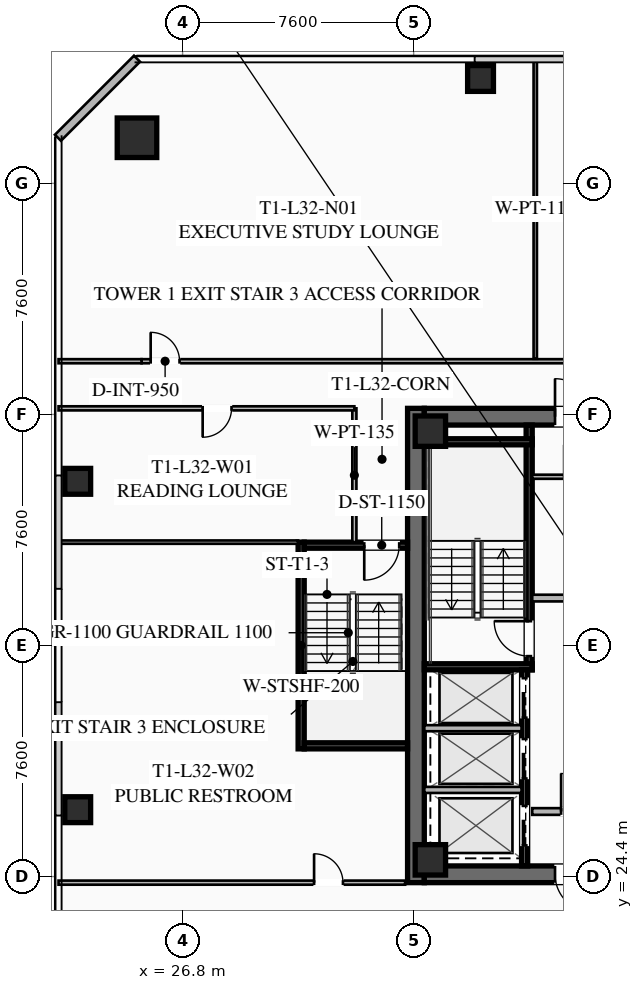
"""IFC4 building model, lengths in metres.
Left out: names, types, materials, properties, quantities, classifications, styles, units other than length and angle.
Written with IfcOpenShell. Run it as: python <this file> out.ifc"""

import sys

from ifc_helpers import new_model, si_unit, direction, frame, frame_2d, origin, origin_2d, place, context, subcontext, project, spatial, rectangle, hollow_rectangle, extrude, element, fill, save


model = new_model("IFC4")
c1 = context("Model", 3, precision=1e-05, world=origin(), true_north=direction((0.0, 1.0)))
c2 = subcontext(c1, "Body", "Model", "MODEL_VIEW")
j1 = project(units=[si_unit("LENGTHUNIT", "METRE"), si_unit("PLANEANGLEUNIT", "RADIAN")], contexts=[c1])
p1 = place(None, origin())
s1 = spatial("IfcSite", under=j1, at=p1, CompositionType="ELEMENT")
p2 = place(p1, origin())
s2 = spatial("IfcBuilding", under=s1, at=p2, CompositionType="ELEMENT")
p3 = place(p2, frame((0.0, 0.0, 121.5)))
s3 = spatial("IfcBuildingStorey", under=s2, at=p3, CompositionType="ELEMENT", Elevation=121.5)
p4 = place(p3, frame((34.475, 24.2, 0.0), z_axis=(0.0, 0.0, 1.0), x_axis=(0.0, 1.0, 0.0)))
e1 = element("IfcWall", 1, at=p4, inside=s3, PredefinedType="SHEAR", context=c2, shape_type="SweptSolid", body=[
    extrude(rectangle(XDim=15.6, YDim=0.55, at=frame_2d((7.8, 0.0))), origin(), (0.0, 0.0, 1.0), 3.55),
])
p5 = place(p3, frame((49.25, 24.475, 0.0), z_axis=(0.0, 0.0, 1.0), x_axis=(-1.0, 0.0, 0.0)))
e2 = element("IfcWall", 2, at=p5, inside=s3, PredefinedType="SHEAR", context=c2, shape_type="SweptSolid", body=[
    extrude(rectangle(XDim=14.5, YDim=0.55, at=frame_2d((7.25, 0.0))), origin(), (0.0, 0.0, 1.0), 3.55),
])
p6 = place(p5, frame((8.95, 0.0, 0.0)))
e3 = element("IfcOpeningElement", 3, at=p6, cuts=e2, PredefinedType="OPENING", context=c2, shape_type="SweptSolid", body=[
    extrude(rectangle(XDim=1.25, YDim=2.25, at=frame_2d((0.625, 1.125))), frame((0.0, 0.285, 0.0), z_axis=(0.0, -1.0, 0.0), x_axis=(1.0, 0.0, 0.0)), (0.0, 0.0, 1.0), 0.57),
])
p7 = place(p5, frame((3.9, 0.0, 0.0)))
e4 = element("IfcOpeningElement", 4, at=p7, cuts=e2, PredefinedType="OPENING", context=c2, shape_type="SweptSolid", body=[
    extrude(rectangle(XDim=1.25, YDim=2.25, at=frame_2d((0.625, 1.125))), frame((0.0, 0.285, 0.0), z_axis=(0.0, -1.0, 0.0), x_axis=(1.0, 0.0, 0.0)), (0.0, 0.0, 1.0), 0.57),
])
p8 = place(p3, frame((34.75, 39.525, 0.0), z_axis=(0.0, 0.0, 1.0), x_axis=(1.0, 0.0, 0.0)))
e5 = element("IfcWall", 5, at=p8, inside=s3, PredefinedType="SHEAR", context=c2, shape_type="SweptSolid", body=[
    extrude(rectangle(XDim=14.5, YDim=0.55, at=frame_2d((7.25, 0.0))), origin(), (0.0, 0.0, 1.0), 3.55),
])
p9 = place(p8, frame((4.3, 0.0, 0.0)))
e6 = element("IfcOpeningElement", 6, at=p9, cuts=e5, PredefinedType="OPENING", context=c2, shape_type="SweptSolid", body=[
    extrude(rectangle(XDim=1.25, YDim=2.25, at=frame_2d((0.625, 1.125))), frame((0.0, 0.285, 0.0), z_axis=(0.0, -1.0, 0.0), x_axis=(1.0, 0.0, 0.0)), (0.0, 0.0, 1.0), 0.57),
])
p10 = place(p8, frame((9.35, 0.0, 0.0)))
e7 = element("IfcOpeningElement", 7, at=p10, cuts=e5, PredefinedType="OPENING", context=c2, shape_type="SweptSolid", body=[
    extrude(rectangle(XDim=1.25, YDim=2.25, at=frame_2d((0.625, 1.125))), frame((0.0, 0.285, 0.0), z_axis=(0.0, -1.0, 0.0), x_axis=(1.0, 0.0, 0.0)), (0.0, 0.0, 1.0), 0.57),
])
for number, where, z_axis, x_axis in (
    (8, (34.95, 24.95, 0.0), (0.0, 0.0, 1.0), (1.0, 0.0, 0.0)),
    (9, (34.95, 39.05, 0.0), (0.0, 0.0, 1.0), (1.0, 0.0, 0.0)),
):
    element("IfcColumn", number, at=place(p3, frame(where, z_axis=z_axis, x_axis=x_axis)), inside=s3, PredefinedType="COLUMN", context=c2, shape_type="SweptSolid", body=[
        extrude(hollow_rectangle(XDim=1.0, YDim=1.0, WallThickness=0.04, at=origin_2d()), origin(), (0.0, 0.0, 1.0), 3.37),
    ])
p11 = place(p3, frame((25.3, 48.7, 0.0), z_axis=(0.0, 0.0, 1.0), x_axis=(1.0, 0.0, 0.0)))
e10 = element("IfcColumn", 10, at=p11, inside=s3, PredefinedType="COLUMN", context=c2, shape_type="SweptSolid", body=[
    extrude(hollow_rectangle(XDim=1.3, YDim=1.3, WallThickness=0.05, at=origin_2d()), origin(), (0.0, 0.0, 1.0), 3.37),
])
for number, where, z_axis, x_axis in (
    (11, (36.6, 50.65, 0.0), (0.0, 0.0, 1.0), (1.0, 0.0, 0.0)),
    (12, (23.35, 37.4, 0.0), (0.0, 0.0, 1.0), (1.0, 0.0, 0.0)),
    (13, (23.35, 26.6, 0.0), (0.0, 0.0, 1.0), (1.0, 0.0, 0.0)),
):
    element("IfcColumn", number, at=place(p3, frame(where, z_axis=z_axis, x_axis=x_axis)), inside=s3, PredefinedType="COLUMN", context=c2, shape_type="SweptSolid", body=[
        extrude(hollow_rectangle(XDim=0.85, YDim=0.85, WallThickness=0.035, at=origin_2d()), origin(), (0.0, 0.0, 1.0), 3.37),
    ])
p12 = place(p3, frame((22.7, 48.7, 0.0), z_axis=(0.0, 0.0, 1.0), x_axis=(0.707106781187, 0.707106781187, 0.0)))
e14 = element("IfcWall", 14, at=p12, inside=s3, PredefinedType="SOLIDWALL", context=c2, shape_type="SweptSolid", body=[
    extrude(rectangle(XDim=3.677, YDim=0.28, at=frame_2d((1.838, 0.0))), origin(), (0.0, 0.0, 1.0), 3.37),
])
p13 = place(p3, frame((38.2, 31.2, 0.0), z_axis=(0.0, 0.0, 1.0), x_axis=(0.0, 1.0, 0.0)))
e15 = element("IfcWall", 15, at=p13, inside=s3, PredefinedType="SHEAR", context=c2, shape_type="SweptSolid", body=[
    extrude(rectangle(XDim=8.05, YDim=0.2, at=frame_2d((4.025, 0.0))), origin(), (0.0, 0.0, 1.0), 3.37),
])
p14 = place(p13, frame((0.45, 0.0, 0.0)))
e16 = element("IfcOpeningElement", 16, at=p14, cuts=e15, PredefinedType="OPENING", context=c2, shape_type="SweptSolid", body=[
    extrude(rectangle(XDim=1.15, YDim=2.2, at=frame_2d((0.575, 1.1))), frame((0.0, 0.11, 0.0), z_axis=(0.0, -1.0, 0.0), x_axis=(1.0, 0.0, 0.0)), (0.0, 0.0, 1.0), 0.22),
])
for number, where, z_axis, x_axis in (
    (17, (34.75, 31.3, 0.0), (0.0, 0.0, 1.0), (1.0, 0.0, 0.0)),
    (18, (34.75, 38.7, 0.0), (0.0, 0.0, 1.0), (1.0, 0.0, 0.0)),
):
    element("IfcWall", number, at=place(p3, frame(where, z_axis=z_axis, x_axis=x_axis)), inside=s3, PredefinedType="SHEAR", context=c2, shape_type="SweptSolid", body=[
        extrude(rectangle(XDim=3.55, YDim=0.2, at=frame_2d((1.775, 0.0))), origin(), (0.0, 0.0, 1.0), 3.37),
    ])
p15 = place(p3, frame((38.3, 33.56, 0.0), z_axis=(0.0, 0.0, 1.0), x_axis=(1.0, 0.0, 0.0)))
e19 = element("IfcWall", 19, at=p15, inside=s3, PredefinedType="SOLIDWALL", context=c2, shape_type="SweptSolid", body=[
    extrude(rectangle(XDim=3.15, YDim=0.22, at=frame_2d((1.575, 0.0))), origin(), (0.0, 0.0, 1.0), 2.723),
])
p16 = place(p3, frame((38.3, 26.54, 0.0), z_axis=(0.0, 0.0, 1.0), x_axis=(1.0, 0.0, 0.0)))
e20 = element("IfcWall", 20, at=p16, inside=s3, PredefinedType="SOLIDWALL", context=c2, shape_type="SweptSolid", body=[
    extrude(rectangle(XDim=3.15, YDim=0.22, at=frame_2d((1.575, 0.0))), origin(), (0.0, 0.0, 1.0), 2.723),
])
p17 = place(p16, frame((0.95, 0.0, 0.0)))
e21 = element("IfcOpeningElement", 21, at=p17, cuts=e20, PredefinedType="OPENING", context=c2, shape_type="SweptSolid", body=[
    extrude(rectangle(XDim=1.25, YDim=2.25, at=frame_2d((0.625, 1.125))), frame((0.0, 0.12, 0.0), z_axis=(0.0, -1.0, 0.0), x_axis=(1.0, 0.0, 0.0)), (0.0, 0.0, 1.0), 0.24),
])
p18 = place(p3, frame((38.05, 24.75, 0.0), z_axis=(0.0, 0.0, 1.0), x_axis=(0.0, 1.0, 0.0)))
e22 = element("IfcWall", 22, at=p18, inside=s3, PredefinedType="SHEAR", context=c2, shape_type="SweptSolid", body=[
    extrude(rectangle(XDim=6.45, YDim=0.2, at=frame_2d((3.225, 0.0))), origin(), (0.0, 0.0, 1.0), 3.37),
])
p19 = place(p18, frame((4.875, 0.0, 0.0)))
e23 = element("IfcOpeningElement", 23, at=p19, cuts=e22, PredefinedType="OPENING", context=c2, shape_type="SweptSolid", body=[
    extrude(rectangle(XDim=1.3, YDim=2.25, at=frame_2d((0.65, 1.125))), frame((0.0, 0.11, 0.0), z_axis=(0.0, -1.0, 0.0), x_axis=(1.0, 0.0, 0.0)), (0.0, 0.0, 1.0), 0.22),
])
p20 = place(p18, frame((2.875, 0.0, 0.0)))
e24 = element("IfcOpeningElement", 24, at=p20, cuts=e22, PredefinedType="OPENING", context=c2, shape_type="SweptSolid", body=[
    extrude(rectangle(XDim=1.3, YDim=2.25, at=frame_2d((0.65, 1.125))), frame((0.0, 0.11, 0.0), z_axis=(0.0, -1.0, 0.0), x_axis=(1.0, 0.0, 0.0)), (0.0, 0.0, 1.0), 0.22),
])
p21 = place(p18, frame((0.675, 0.0, 0.0)))
e25 = element("IfcOpeningElement", 25, at=p21, cuts=e22, PredefinedType="OPENING", context=c2, shape_type="SweptSolid", body=[
    extrude(rectangle(XDim=1.3, YDim=2.25, at=frame_2d((0.65, 1.125))), frame((0.0, 0.11, 0.0), z_axis=(0.0, -1.0, 0.0), x_axis=(1.0, 0.0, 0.0)), (0.0, 0.0, 1.0), 0.22),
])
for number, where, z_axis, x_axis in (
    (26, (34.75, 27.25, 0.0), (0.0, 0.0, 1.0), (1.0, 0.0, 0.0)),
    (27, (34.75, 29.28, 0.0), (0.0, 0.0, 1.0), (1.0, 0.0, 0.0)),
):
    element("IfcWall", number, at=place(p3, frame(where, z_axis=z_axis, x_axis=x_axis)), inside=s3, PredefinedType="SOLIDWALL", context=c2, shape_type="SweptSolid", body=[
        extrude(rectangle(XDim=3.2, YDim=0.2, at=frame_2d((1.6, 0.0))), origin(), (0.0, 0.0, 1.0), 3.37),
    ])
p22 = place(p3, frame((38.3, 37.55, 0.0), z_axis=(0.0, 0.0, 1.0), x_axis=(1.0, 0.0, 0.0)))
e28 = element("IfcWall", 28, at=p22, inside=s3, PredefinedType="PARTITIONING", context=c2, shape_type="SweptSolid", body=[
    extrude(rectangle(XDim=3.15, YDim=0.135, at=frame_2d((1.575, 0.0))), origin(), (0.0, 0.0, 1.0), 2.723),
])
p23 = place(p22, frame((1.05, 0.0, 0.0)))
e29 = element("IfcOpeningElement", 29, at=p23, cuts=e28, PredefinedType="OPENING", context=c2, shape_type="SweptSolid", body=[
    extrude(rectangle(XDim=1.05, YDim=2.2, at=frame_2d((0.525, 1.1))), frame((0.0, 0.077, 0.0), z_axis=(0.0, -1.0, 0.0), x_axis=(1.0, 0.0, 0.0)), (0.0, 0.0, 1.0), 0.155),
])
p24 = place(p3, frame((30.7, 28.6, 0.0), z_axis=(0.0, 0.0, 1.0), x_axis=(0.0, 1.0, 0.0)))
e30 = element("IfcWall", 30, at=p24, inside=s3, PredefinedType="SHEAR", context=c2, shape_type="SweptSolid", body=[
    extrude(rectangle(XDim=6.8, YDim=0.2, at=frame_2d((3.4, 0.0))), origin(), (0.0, 0.0, 1.0), 3.37),
])
p25 = place(p3, frame((34.2, 35.3, 0.0), z_axis=(0.0, 0.0, 1.0), x_axis=(-1.0, 0.0, 0.0)))
e31 = element("IfcWall", 31, at=p25, inside=s3, PredefinedType="SHEAR", context=c2, shape_type="SweptSolid", body=[
    extrude(rectangle(XDim=3.4, YDim=0.2, at=frame_2d((1.7, 0.0))), origin(), (0.0, 0.0, 1.0), 3.37),
])
p26 = place(p25, frame((0.275, 0.0, 0.0)))
e32 = element("IfcOpeningElement", 32, at=p26, cuts=e31, PredefinedType="OPENING", context=c2, shape_type="SweptSolid", body=[
    extrude(rectangle(XDim=1.15, YDim=2.2, at=frame_2d((0.575, 1.1))), frame((0.0, 0.11, 0.0), z_axis=(0.0, -1.0, 0.0), x_axis=(1.0, 0.0, 0.0)), (0.0, 0.0, 1.0), 0.22),
])
p27 = place(p3, frame((30.8, 28.7, 0.0), z_axis=(0.0, 0.0, 1.0), x_axis=(1.0, 0.0, 0.0)))
e33 = element("IfcWall", 33, at=p27, inside=s3, PredefinedType="SHEAR", context=c2, shape_type="SweptSolid", body=[
    extrude(rectangle(XDim=3.4, YDim=0.2, at=frame_2d((1.7, 0.0))), origin(), (0.0, 0.0, 1.0), 3.37),
])
p28 = place(p3, frame((32.45, 35.4, 0.0), z_axis=(0.0, 0.0, 1.0), x_axis=(0.0, 1.0, 0.0)))
e34 = element("IfcWall", 34, at=p28, inside=s3, PredefinedType="PARTITIONING", context=c2, shape_type="SweptSolid", body=[
    extrude(rectangle(XDim=4.4, YDim=0.135, at=frame_2d((2.2, 0.0))), origin(), (0.0, 0.0, 1.0), 2.723),
])
p29 = place(p3, frame((25.45, 41.35, 0.0), z_axis=(0.0, 0.0, 1.0), x_axis=(1.0, 0.0, 0.0)))
e35 = element("IfcWall", 35, at=p29, inside=s3, PredefinedType="PARTITIONING", context=c2, shape_type="SweptSolid", body=[
    extrude(rectangle(XDim=33.1, YDim=0.135, at=frame_2d((16.55, 0.0))), origin(), (0.0, 0.0, 1.0), 2.723),
])
p30 = place(p29, frame((0.3, 0.0, 0.0)))
e36 = element("IfcOpeningElement", 36, at=p30, cuts=e35, PredefinedType="OPENING", context=c2, shape_type="SweptSolid", body=[
    extrude(rectangle(XDim=0.95, YDim=2.05, at=frame_2d((0.475, 1.025))), frame((0.0, 0.077, 0.0), z_axis=(0.0, -1.0, 0.0), x_axis=(1.0, 0.0, 0.0)), (0.0, 0.0, 1.0), 0.155),
])
p31 = place(p29, frame((31.85, 0.0, 0.0)))
e37 = element("IfcOpeningElement", 37, at=p31, cuts=e35, PredefinedType="OPENING", context=c2, shape_type="SweptSolid", body=[
    extrude(rectangle(XDim=0.95, YDim=2.05, at=frame_2d((0.475, 1.025))), frame((0.0, 0.077, 0.0), z_axis=(0.0, -1.0, 0.0), x_axis=(1.0, 0.0, 0.0)), (0.0, 0.0, 1.0), 0.155),
])
p32 = place(p3, frame((22.72, 41.35, 0.0), z_axis=(0.0, 0.0, 1.0), x_axis=(1.0, 0.0, 0.0)))
e38 = element("IfcWall", 38, at=p32, inside=s3, PredefinedType="PARTITIONING", context=c2, shape_type="SweptSolid", body=[
    extrude(rectangle(XDim=2.73, YDim=0.135, at=frame_2d((1.365, 0.0))), origin(), (0.0, 0.0, 1.0), 2.723),
])
p33 = place(p3, frame((38.4, 41.43, 0.0), z_axis=(0.0, 0.0, 1.0), x_axis=(0.0, 1.0, 0.0)))
e39 = element("IfcWall", 39, at=p33, inside=s3, PredefinedType="PARTITIONING", context=c2, shape_type="SweptSolid", body=[
    extrude(rectangle(XDim=9.85, YDim=0.11, at=frame_2d((4.925, 0.0))), origin(), (0.0, 0.0, 1.0), 2.723),
])
p34 = place(p3, frame((32.45, 39.8, 0.0), z_axis=(0.0, 0.0, 1.0), x_axis=(-1.0, 0.0, 0.0)))
e40 = element("IfcWall", 40, at=p34, inside=s3, PredefinedType="PARTITIONING", context=c2, shape_type="SweptSolid", body=[
    extrude(rectangle(XDim=9.73, YDim=0.135, at=frame_2d((4.865, 0.0))), origin(), (0.0, 0.0, 1.0), 2.723),
])
p35 = place(p34, frame((4.04, 0.0, 0.0)))
e41 = element("IfcOpeningElement", 41, at=p35, cuts=e40, PredefinedType="OPENING", context=c2, shape_type="SweptSolid", body=[
    extrude(rectangle(XDim=0.95, YDim=2.05, at=frame_2d((0.475, 1.025))), frame((0.0, 0.077, 0.0), z_axis=(0.0, -1.0, 0.0), x_axis=(1.0, 0.0, 0.0)), (0.0, 0.0, 1.0), 0.155),
])
p36 = place(p3, frame((22.72, 24.2, 0.0), z_axis=(0.0, 0.0, 1.0), x_axis=(1.0, 0.0, 0.0)))
e42 = element("IfcWall", 42, at=p36, inside=s3, PredefinedType="PARTITIONING", context=c2, shape_type="SweptSolid", body=[
    extrude(rectangle(XDim=11.4, YDim=0.135, at=frame_2d((5.7, 0.0))), origin(), (0.0, 0.0, 1.0), 2.723),
])
p37 = place(p36, frame((8.405, 0.0, 0.0)))
e43 = element("IfcOpeningElement", 43, at=p37, cuts=e42, PredefinedType="OPENING", context=c2, shape_type="SweptSolid", body=[
    extrude(rectangle(XDim=0.95, YDim=2.05, at=frame_2d((0.475, 1.025))), frame((0.0, 0.077, 0.0), z_axis=(0.0, -1.0, 0.0), x_axis=(1.0, 0.0, 0.0)), (0.0, 0.0, 1.0), 0.155),
])
p38 = place(p3, frame((30.6, 35.4, 0.0), z_axis=(0.0, 0.0, 1.0), x_axis=(-1.0, 0.0, 0.0)))
e44 = element("IfcWall", 44, at=p38, inside=s3, PredefinedType="PARTITIONING", context=c2, shape_type="SweptSolid", body=[
    extrude(rectangle(XDim=7.88, YDim=0.11, at=frame_2d((3.94, 0.0))), origin(), (0.0, 0.0, 1.0), 2.723),
])
p39 = place(p9, origin())
e45 = element("IfcDoor", 45, at=p39, inside=s3, OperationType="SINGLE_SWING_LEFT", PredefinedType="DOOR", context=c2, shape_type="SweptSolid", body=[
    extrude(rectangle(XDim=1.25, YDim=2.25, at=frame_2d((0.625, 1.125))), frame((0.0, 0.025, 0.0), z_axis=(0.0, -1.0, 0.0), x_axis=(1.0, 0.0, 0.0)), (0.0, 0.0, 1.0), 0.05),
])
fill(e6, e45)
p40 = place(p6, origin())
e46 = element("IfcDoor", 46, at=p40, inside=s3, OperationType="SINGLE_SWING_LEFT", PredefinedType="DOOR", context=c2, shape_type="SweptSolid", body=[
    extrude(rectangle(XDim=1.25, YDim=2.25, at=frame_2d((0.625, 1.125))), frame((0.0, 0.025, 0.0), z_axis=(0.0, -1.0, 0.0), x_axis=(1.0, 0.0, 0.0)), (0.0, 0.0, 1.0), 0.05),
])
fill(e3, e46)
p41 = place(p14, origin())
e47 = element("IfcDoor", 47, at=p41, inside=s3, OperationType="SINGLE_SWING_RIGHT", PredefinedType="DOOR", context=c2, shape_type="SweptSolid", body=[
    extrude(rectangle(XDim=1.15, YDim=2.2, at=frame_2d((0.575, 1.1))), frame((0.0, 0.025, 0.0), z_axis=(0.0, -1.0, 0.0), x_axis=(1.0, 0.0, 0.0)), (0.0, 0.0, 1.0), 0.05),
])
fill(e16, e47)
p42 = place(p17, origin())
e48 = element("IfcDoor", 48, at=p42, inside=s3, OperationType="SINGLE_SWING_LEFT", PredefinedType="DOOR", context=c2, shape_type="SweptSolid", body=[
    extrude(rectangle(XDim=1.25, YDim=2.25, at=frame_2d((0.625, 1.125))), frame((0.0, 0.025, 0.0), z_axis=(0.0, -1.0, 0.0), x_axis=(1.0, 0.0, 0.0)), (0.0, 0.0, 1.0), 0.05),
])
fill(e21, e48)
p43 = place(p26, origin())
e49 = element("IfcDoor", 49, at=p43, inside=s3, OperationType="SINGLE_SWING_RIGHT", PredefinedType="DOOR", context=c2, shape_type="SweptSolid", body=[
    extrude(rectangle(XDim=1.15, YDim=2.2, at=frame_2d((0.575, 1.1))), frame((0.0, 0.025, 0.0), z_axis=(0.0, -1.0, 0.0), x_axis=(1.0, 0.0, 0.0)), (0.0, 0.0, 1.0), 0.05),
])
fill(e32, e49)
p44 = place(p30, origin())
e50 = element("IfcDoor", 50, at=p44, inside=s3, OperationType="SINGLE_SWING_LEFT", PredefinedType="DOOR", context=c2, shape_type="SweptSolid", body=[
    extrude(rectangle(XDim=0.95, YDim=2.05, at=frame_2d((0.475, 1.025))), frame((0.0, 0.025, 0.0), z_axis=(0.0, -1.0, 0.0), x_axis=(1.0, 0.0, 0.0)), (0.0, 0.0, 1.0), 0.05),
])
fill(e36, e50)
p45 = place(p35, origin())
e51 = element("IfcDoor", 51, at=p45, inside=s3, OperationType="SINGLE_SWING_RIGHT", PredefinedType="DOOR", context=c2, shape_type="SweptSolid", body=[
    extrude(rectangle(XDim=0.95, YDim=2.05, at=frame_2d((0.475, 1.025))), frame((0.0, 0.025, 0.0), z_axis=(0.0, -1.0, 0.0), x_axis=(1.0, 0.0, 0.0)), (0.0, 0.0, 1.0), 0.05),
])
fill(e41, e51)
p46 = place(p37, origin())
e52 = element("IfcDoor", 52, at=p46, inside=s3, OperationType="SINGLE_SWING_LEFT", PredefinedType="DOOR", context=c2, shape_type="SweptSolid", body=[
    extrude(rectangle(XDim=0.95, YDim=2.05, at=frame_2d((0.475, 1.025))), frame((0.0, 0.025, 0.0), z_axis=(0.0, -1.0, 0.0), x_axis=(1.0, 0.0, 0.0)), (0.0, 0.0, 1.0), 0.05),
])
fill(e43, e52)
p47 = place(p19, origin())
e53 = element("IfcDoor", 53, at=p47, inside=s3, OperationType="SLIDING_TO_LEFT", PredefinedType="DOOR", context=c2, shape_type="SweptSolid", body=[
    extrude(rectangle(XDim=1.3, YDim=2.25, at=frame_2d((0.65, 1.125))), frame((0.0, 0.025, 0.0), z_axis=(0.0, -1.0, 0.0), x_axis=(1.0, 0.0, 0.0)), (0.0, 0.0, 1.0), 0.05),
])
fill(e23, e53)
p48 = place(p20, origin())
e54 = element("IfcDoor", 54, at=p48, inside=s3, OperationType="SLIDING_TO_LEFT", PredefinedType="DOOR", context=c2, shape_type="SweptSolid", body=[
    extrude(rectangle(XDim=1.3, YDim=2.25, at=frame_2d((0.65, 1.125))), frame((0.0, 0.025, 0.0), z_axis=(0.0, -1.0, 0.0), x_axis=(1.0, 0.0, 0.0)), (0.0, 0.0, 1.0), 0.05),
])
fill(e24, e54)
p49 = place(p21, origin())
e55 = element("IfcDoor", 55, at=p49, inside=s3, OperationType="SLIDING_TO_LEFT", PredefinedType="DOOR", context=c2, shape_type="SweptSolid", body=[
    extrude(rectangle(XDim=1.3, YDim=2.25, at=frame_2d((0.65, 1.125))), frame((0.0, 0.025, 0.0), z_axis=(0.0, -1.0, 0.0), x_axis=(1.0, 0.0, 0.0)), (0.0, 0.0, 1.0), 0.05),
])
fill(e25, e55)
save(model, sys.argv[1])
